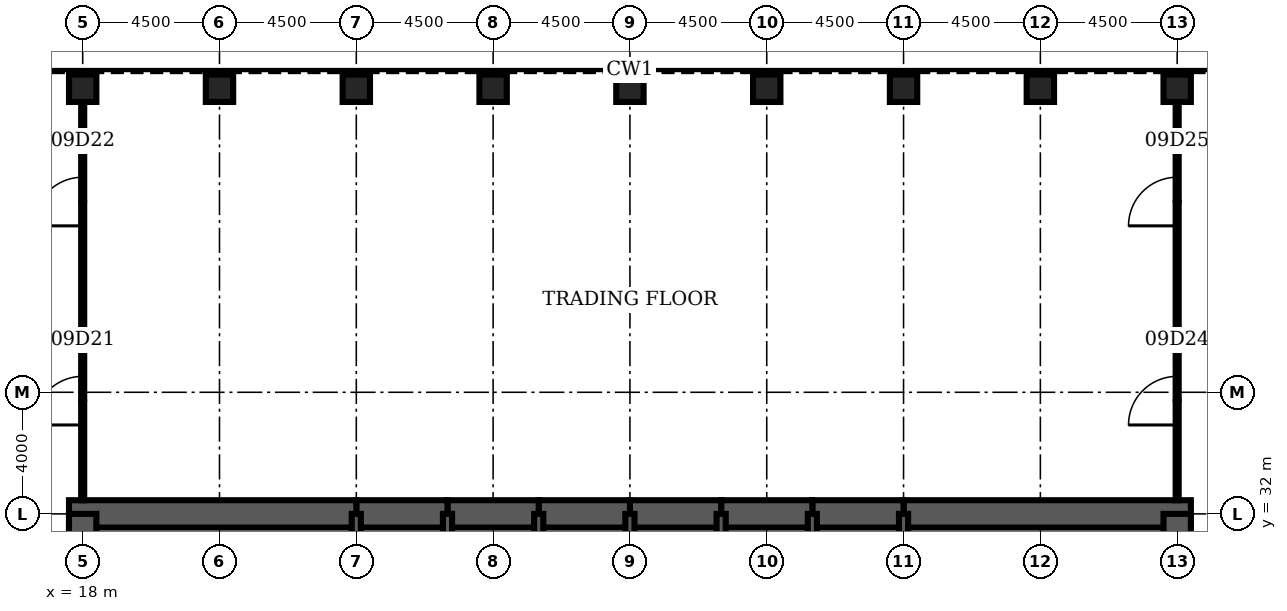
"""IFC4 building model, lengths in metres.
Left out: names, types, materials, properties, quantities, classifications, styles, units other than length and angle.
Written with IfcOpenShell. Run it as: python <this file> out.ifc"""

import sys

from ifc_helpers import new_model, si_unit, direction, frame, frame_2d, origin, origin_2d, place, context, subcontext, project, spatial, rectangle, hollow_rectangle, extrude, element, fill, save


model = new_model("IFC4")
c1 = context("Model", 3, precision=1e-05, world=origin(), true_north=direction((0.0, 1.0)))
c2 = subcontext(c1, "Body", "Model", "MODEL_VIEW")
j1 = project(units=[si_unit("LENGTHUNIT", "METRE"), si_unit("PLANEANGLEUNIT", "RADIAN")], contexts=[c1])
p1 = place(None, origin())
s1 = spatial("IfcSite", under=j1, at=p1, CompositionType="ELEMENT")
p2 = place(p1, origin())
s2 = spatial("IfcBuilding", under=s1, at=p2, CompositionType="ELEMENT")
p3 = place(p2, frame((0.0, 0.0, 45.5)))
s3 = spatial("IfcBuildingStorey", under=s2, at=p3, CompositionType="ELEMENT", Elevation=45.5)
for number, where, z_axis, x_axis in (
    (1, (54.0, 46.0, 0.0), (0.0, 0.0, 1.0), (0.0, 1.0, 0.0)),
    (2, (49.5, 46.0, 0.0), (0.0, 0.0, 1.0), (0.0, 1.0, 0.0)),
    (3, (45.0, 46.0, 0.0), (0.0, 0.0, 1.0), (0.0, 1.0, 0.0)),
    (4, (40.5, 46.0, 0.0), (0.0, 0.0, 1.0), (0.0, 1.0, 0.0)),
    (5, (36.0, 46.0, 0.0), (0.0, 0.0, 1.0), (0.0, 1.0, 0.0)),
    (6, (31.5, 46.0, 0.0), (0.0, 0.0, 1.0), (0.0, 1.0, 0.0)),
    (7, (27.0, 46.0, 0.0), (0.0, 0.0, 1.0), (0.0, 1.0, 0.0)),
    (8, (22.5, 46.0, 0.0), (0.0, 0.0, 1.0), (0.0, 1.0, 0.0)),
    (9, (18.0, 46.0, 0.0), (0.0, 0.0, 1.0), (0.0, 1.0, 0.0)),
):
    element("IfcColumn", number, at=place(p3, frame(where, z_axis=z_axis, x_axis=x_axis)), inside=s3, PredefinedType="COLUMN", context=c2, shape_type="SweptSolid", body=[
        extrude(hollow_rectangle(XDim=0.9, YDim=0.9, WallThickness=0.12, at=origin_2d()), origin(), (0.0, 0.0, 1.0), 4.5),
    ])
p4 = place(p3, frame((54.45, 32.0, 0.0), z_axis=(0.0, 0.0, 1.0), x_axis=(-1.0, 0.0, 0.0)))
e10 = element("IfcWall", 10, at=p4, inside=s3, PredefinedType="SHEAR", context=c2, shape_type="SweptSolid", body=[
    extrude(rectangle(XDim=9.45, YDim=0.9, at=frame_2d((4.725, 0.0))), origin(), (0.0, 0.0, 1.0), 4.5),
])
for number, where, z_axis, x_axis in (
    (11, (45.0, 32.0, 0.0), (0.0, 0.0, 1.0), (-1.0, 0.0, 0.0)),
    (12, (42.0, 32.0, 0.0), (0.0, 0.0, 1.0), (-1.0, 0.0, 0.0)),
    (13, (39.0, 32.0, 0.0), (0.0, 0.0, 1.0), (-1.0, 0.0, 0.0)),
    (14, (36.0, 32.0, 0.0), (0.0, 0.0, 1.0), (-1.0, 0.0, 0.0)),
    (15, (33.0, 32.0, 0.0), (0.0, 0.0, 1.0), (-1.0, 0.0, 0.0)),
    (16, (30.0, 32.0, 0.0), (0.0, 0.0, 1.0), (-1.0, 0.0, 0.0)),
):
    element("IfcWall", number, at=place(p3, frame(where, z_axis=z_axis, x_axis=x_axis)), inside=s3, PredefinedType="SHEAR", context=c2, shape_type="SweptSolid", body=[
        extrude(rectangle(XDim=3.0, YDim=0.9, at=frame_2d((1.5, 0.0))), origin(), (0.0, 0.0, 1.0), 4.5),
    ])
p5 = place(p3, frame((27.0, 32.0, 0.0), z_axis=(0.0, 0.0, 1.0), x_axis=(-1.0, 0.0, 0.0)))
e17 = element("IfcWall", 17, at=p5, inside=s3, PredefinedType="SHEAR", context=c2, shape_type="SweptSolid", body=[
    extrude(rectangle(XDim=9.45, YDim=0.9, at=frame_2d((4.725, 0.0))), origin(), (0.0, 0.0, 1.0), 4.5),
])
for number, where, z_axis, x_axis in (
    (18, (18.0, 32.0, 0.0), (0.0, 0.0, 1.0), (0.0, -1.0, 0.0)),
    (19, (54.0, 28.8, 0.0), (0.0, 0.0, 1.0), (0.0, 1.0, 0.0)),
):
    element("IfcWall", number, at=place(p3, frame(where, z_axis=z_axis, x_axis=x_axis)), inside=s3, PredefinedType="SHEAR", context=c2, shape_type="SweptSolid", body=[
        extrude(rectangle(XDim=3.2, YDim=0.9, at=frame_2d((1.6, 0.0))), origin(), (0.0, 0.0, 1.0), 4.5),
    ])
for number, where, z_axis, x_axis in (
    (20, (27.0, 28.8, 0.0), (0.0, 0.0, 1.0), (0.0, 1.0, 0.0)),
    (21, (30.0, 28.8, 0.0), (0.0, 0.0, 1.0), (0.0, 1.0, 0.0)),
    (22, (33.0, 28.8, 0.0), (0.0, 0.0, 1.0), (0.0, 1.0, 0.0)),
    (23, (36.0, 28.8, 0.0), (0.0, 0.0, 1.0), (0.0, 1.0, 0.0)),
    (24, (39.0, 28.8, 0.0), (0.0, 0.0, 1.0), (0.0, 1.0, 0.0)),
    (25, (42.0, 28.8, 0.0), (0.0, 0.0, 1.0), (0.0, 1.0, 0.0)),
    (26, (45.0, 28.8, 0.0), (0.0, 0.0, 1.0), (0.0, 1.0, 0.0)),
):
    element("IfcWall", number, at=place(p3, frame(where, z_axis=z_axis, x_axis=x_axis)), inside=s3, PredefinedType="SOLIDWALL", context=c2, shape_type="SweptSolid", body=[
        extrude(rectangle(XDim=3.2, YDim=0.3, at=frame_2d((1.6, 0.0))), origin(), (0.0, 0.0, 1.0), 4.5),
    ])
p6 = place(p3, frame((18.0, 32.45, 0.0), z_axis=(0.0, 0.0, 1.0), x_axis=(0.0, 1.0, 0.0)))
e27 = element("IfcWall", 27, at=p6, inside=s3, PredefinedType="PARTITIONING", context=c2, shape_type="SweptSolid", body=[
    extrude(rectangle(XDim=13.1, YDim=0.1, at=frame_2d((6.55, 0.0))), origin(), (0.0, 0.0, 1.0), 3.0),
])
p7 = place(p6, frame((2.475, 0.0, 0.0)))
e28 = element("IfcOpeningElement", 28, at=p7, cuts=e27, PredefinedType="OPENING", context=c2, shape_type="SweptSolid", body=[
    extrude(rectangle(XDim=1.6, YDim=2.1, at=frame_2d((0.8, 1.05))), frame((0.0, 0.06, 0.0), z_axis=(0.0, -1.0, 0.0), x_axis=(1.0, 0.0, 0.0)), (0.0, 0.0, 1.0), 0.12),
])
p8 = place(p6, frame((9.025, 0.0, 0.0)))
e29 = element("IfcOpeningElement", 29, at=p8, cuts=e27, PredefinedType="OPENING", context=c2, shape_type="SweptSolid", body=[
    extrude(rectangle(XDim=1.6, YDim=2.1, at=frame_2d((0.8, 1.05))), frame((0.0, 0.06, 0.0), z_axis=(0.0, -1.0, 0.0), x_axis=(1.0, 0.0, 0.0)), (0.0, 0.0, 1.0), 0.12),
])
p9 = place(p3, frame((54.0, 32.45, 0.0), z_axis=(0.0, 0.0, 1.0), x_axis=(0.0, 1.0, 0.0)))
e30 = element("IfcWall", 30, at=p9, inside=s3, PredefinedType="PARTITIONING", context=c2, shape_type="SweptSolid", body=[
    extrude(rectangle(XDim=13.1, YDim=0.1, at=frame_2d((6.55, 0.0))), origin(), (0.0, 0.0, 1.0), 3.0),
])
p10 = place(p9, frame((2.475, 0.0, 0.0)))
e31 = element("IfcOpeningElement", 31, at=p10, cuts=e30, PredefinedType="OPENING", context=c2, shape_type="SweptSolid", body=[
    extrude(rectangle(XDim=1.6, YDim=2.1, at=frame_2d((0.8, 1.05))), frame((0.0, 0.06, 0.0), z_axis=(0.0, -1.0, 0.0), x_axis=(1.0, 0.0, 0.0)), (0.0, 0.0, 1.0), 0.12),
])
p11 = place(p9, frame((9.025, 0.0, 0.0)))
e32 = element("IfcOpeningElement", 32, at=p11, cuts=e30, PredefinedType="OPENING", context=c2, shape_type="SweptSolid", body=[
    extrude(rectangle(XDim=1.6, YDim=2.1, at=frame_2d((0.8, 1.05))), frame((0.0, 0.06, 0.0), z_axis=(0.0, -1.0, 0.0), x_axis=(1.0, 0.0, 0.0)), (0.0, 0.0, 1.0), 0.12),
])
p12 = place(p7, origin())
e33 = element("IfcDoor", 33, at=p12, inside=s3, OperationType="SINGLE_SWING_LEFT", PredefinedType="DOOR", context=c2, shape_type="SweptSolid", body=[
    extrude(rectangle(XDim=1.6, YDim=2.1, at=frame_2d((0.8, 1.05))), frame((0.0, 0.025, 0.0), z_axis=(0.0, -1.0, 0.0), x_axis=(1.0, 0.0, 0.0)), (0.0, 0.0, 1.0), 0.05),
])
fill(e28, e33)
p13 = place(p8, origin())
e34 = element("IfcDoor", 34, at=p13, inside=s3, OperationType="SINGLE_SWING_LEFT", PredefinedType="DOOR", context=c2, shape_type="SweptSolid", body=[
    extrude(rectangle(XDim=1.6, YDim=2.1, at=frame_2d((0.8, 1.05))), frame((0.0, 0.025, 0.0), z_axis=(0.0, -1.0, 0.0), x_axis=(1.0, 0.0, 0.0)), (0.0, 0.0, 1.0), 0.05),
])
fill(e29, e34)
p14 = place(p10, origin())
e35 = element("IfcDoor", 35, at=p14, inside=s3, OperationType="SINGLE_SWING_LEFT", PredefinedType="DOOR", context=c2, shape_type="SweptSolid", body=[
    extrude(rectangle(XDim=1.6, YDim=2.1, at=frame_2d((0.8, 1.05))), frame((0.0, 0.025, 0.0), z_axis=(0.0, -1.0, 0.0), x_axis=(1.0, 0.0, 0.0)), (0.0, 0.0, 1.0), 0.05),
])
fill(e31, e35)
p15 = place(p11, origin())
e36 = element("IfcDoor", 36, at=p15, inside=s3, OperationType="SINGLE_SWING_LEFT", PredefinedType="DOOR", context=c2, shape_type="SweptSolid", body=[
    extrude(rectangle(XDim=1.6, YDim=2.1, at=frame_2d((0.8, 1.05))), frame((0.0, 0.025, 0.0), z_axis=(0.0, -1.0, 0.0), x_axis=(1.0, 0.0, 0.0)), (0.0, 0.0, 1.0), 0.05),
])
fill(e32, e36)
save(model, sys.argv[1])
